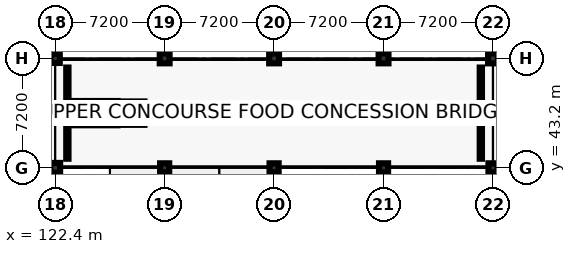
"""IFC4 building model, lengths in metres.
Left out: names, types, materials, properties, quantities, classifications, styles, units other than length and angle.
Written with IfcOpenShell. Run it as: python <this file> out.ifc"""

import sys

from ifc_helpers import new_model, si_unit, direction, frame, frame_2d, origin, origin_2d, place, context, subcontext, project, spatial, rectangle, extrude, element, fill, save


model = new_model("IFC4")
c1 = context("Model", 3, precision=1e-05, world=origin(), true_north=direction((0.0, 1.0)))
c2 = subcontext(c1, "Body", "Model", "MODEL_VIEW")
j1 = project(units=[si_unit("LENGTHUNIT", "METRE"), si_unit("PLANEANGLEUNIT", "RADIAN")], contexts=[c1])
p1 = place(None, origin())
s1 = spatial("IfcSite", under=j1, at=p1, CompositionType="ELEMENT")
p2 = place(p1, origin())
s2 = spatial("IfcBuilding", under=s1, at=p2, CompositionType="ELEMENT")
p3 = place(p2, frame((0.0, 0.0, 13.8)))
s3 = spatial("IfcBuildingStorey", under=s2, at=p3, CompositionType="ELEMENT", Elevation=13.8)
p4 = place(p3, frame((122.4, 43.2, 0.0), z_axis=(0.0, 0.0, 1.0), x_axis=(1.0, 0.0, 0.0)))
e1 = element("IfcColumn", 1, at=p4, inside=s3, PredefinedType="COLUMN", context=c2, shape_type="SweptSolid", body=[
    extrude(rectangle(XDim=0.65, YDim=0.65, at=origin_2d()), origin(), (0.0, 0.0, 1.0), 4.8),
])
for number, where, z_axis, x_axis in (
    (2, (122.4, 50.4, 0.0), (0.0, 0.0, 1.0), (1.0, 0.0, 0.0)),
    (3, (129.6, 43.2, 0.0), (0.0, 0.0, 1.0), (1.0, 0.0, 0.0)),
):
    element("IfcColumn", number, at=place(p3, frame(where, z_axis=z_axis, x_axis=x_axis)), inside=s3, PredefinedType="COLUMN", context=c2, shape_type="SweptSolid", body=[
        extrude(rectangle(XDim=0.6, YDim=0.6, at=origin_2d()), origin(), (0.0, 0.0, 1.0), 4.8),
    ])
p5 = place(p3, frame((129.6, 50.4, 0.0), z_axis=(0.0, 0.0, 1.0), x_axis=(1.0, 0.0, 0.0)))
e4 = element("IfcColumn", 4, at=p5, inside=s3, PredefinedType="COLUMN", context=c2, shape_type="SweptSolid", body=[
    extrude(rectangle(XDim=0.65, YDim=0.65, at=origin_2d()), origin(), (0.0, 0.0, 1.0), 4.8),
])
p6 = place(p3, frame((136.8, 43.2, 0.0), z_axis=(0.0, 0.0, 1.0), x_axis=(1.0, 0.0, 0.0)))
e5 = element("IfcColumn", 5, at=p6, inside=s3, PredefinedType="COLUMN", context=c2, shape_type="SweptSolid", body=[
    extrude(rectangle(XDim=0.6, YDim=0.6, at=origin_2d()), origin(), (0.0, 0.0, 1.0), 4.8),
])
p7 = place(p3, frame((136.8, 50.4, 0.0), z_axis=(0.0, 0.0, 1.0), x_axis=(1.0, 0.0, 0.0)))
e6 = element("IfcColumn", 6, at=p7, inside=s3, PredefinedType="COLUMN", context=c2, shape_type="SweptSolid", body=[
    extrude(rectangle(XDim=0.65, YDim=0.65, at=origin_2d()), origin(), (0.0, 0.0, 1.0), 4.8),
])
p8 = place(p3, frame((144.0, 43.2, 0.0), z_axis=(0.0, 0.0, 1.0), x_axis=(1.0, 0.0, 0.0)))
e7 = element("IfcColumn", 7, at=p8, inside=s3, PredefinedType="COLUMN", context=c2, shape_type="SweptSolid", body=[
    extrude(rectangle(XDim=0.6, YDim=0.6, at=origin_2d()), origin(), (0.0, 0.0, 1.0), 4.8),
])
p9 = place(p3, frame((144.0, 50.4, 0.0), z_axis=(0.0, 0.0, 1.0), x_axis=(1.0, 0.0, 0.0)))
e8 = element("IfcColumn", 8, at=p9, inside=s3, PredefinedType="COLUMN", context=c2, shape_type="SweptSolid", body=[
    extrude(rectangle(XDim=0.65, YDim=0.65, at=origin_2d()), origin(), (0.0, 0.0, 1.0), 4.8),
])
p10 = place(p3, frame((151.2, 43.2, 0.0), z_axis=(0.0, 0.0, 1.0), x_axis=(1.0, 0.0, 0.0)))
e9 = element("IfcColumn", 9, at=p10, inside=s3, PredefinedType="COLUMN", context=c2, shape_type="SweptSolid", body=[
    extrude(rectangle(XDim=0.6, YDim=0.6, at=origin_2d()), origin(), (0.0, 0.0, 1.0), 4.8),
])
p11 = place(p3, frame((151.2, 50.4, 0.0), z_axis=(0.0, 0.0, 1.0), x_axis=(1.0, 0.0, 0.0)))
e10 = element("IfcColumn", 10, at=p11, inside=s3, PredefinedType="COLUMN", context=c2, shape_type="SweptSolid", body=[
    extrude(rectangle(XDim=0.65, YDim=0.65, at=origin_2d()), origin(), (0.0, 0.0, 1.0), 4.8),
])
p12 = place(p3, frame((150.4, 43.8, 0.0), z_axis=(0.0, 0.0, 1.0), x_axis=(0.0, 1.0, 0.0)))
e11 = element("IfcWall", 11, at=p12, inside=s3, PredefinedType="PARTITIONING", context=c2, shape_type="SweptSolid", body=[
    extrude(rectangle(XDim=6.0, YDim=0.15, at=frame_2d((3.0, 0.0))), origin(), (0.0, 0.0, 1.0), 3.59),
])
p13 = place(p3, frame((123.2, 49.8, 0.0), z_axis=(0.0, 0.0, 1.0), x_axis=(0.0, -1.0, 0.0)))
e12 = element("IfcWall", 12, at=p13, inside=s3, PredefinedType="PARTITIONING", context=c2, shape_type="SweptSolid", body=[
    extrude(rectangle(XDim=6.0, YDim=0.15, at=frame_2d((3.0, 0.0))), origin(), (0.0, 0.0, 1.0), 3.59),
])
p14 = place(p13, frame((2.1, 0.0, 0.0)))
e13 = element("IfcOpeningElement", 13, at=p14, cuts=e12, PredefinedType="OPENING", context=c2, shape_type="SweptSolid", body=[
    extrude(rectangle(XDim=1.8, YDim=2.3, at=frame_2d((0.9, 1.15))), frame((0.0, 0.085, 0.0), z_axis=(0.0, -1.0, 0.0), x_axis=(1.0, 0.0, 0.0)), (0.0, 0.0, 1.0), 0.17),
])
p15 = place(p14, origin())
e14 = element("IfcDoor", 14, at=p15, inside=s3, OperationType="DOUBLE_DOOR_SINGLE_SWING", PredefinedType="DOOR", context=c2, shape_type="SweptSolid", body=[
    extrude(rectangle(XDim=1.8, YDim=2.3, at=frame_2d((0.9, 1.15))), frame((0.0, 0.025, 0.0), z_axis=(0.0, -1.0, 0.0), x_axis=(1.0, 0.0, 0.0)), (0.0, 0.0, 1.0), 0.05),
])
fill(e13, e14)
save(model, sys.argv[1])
